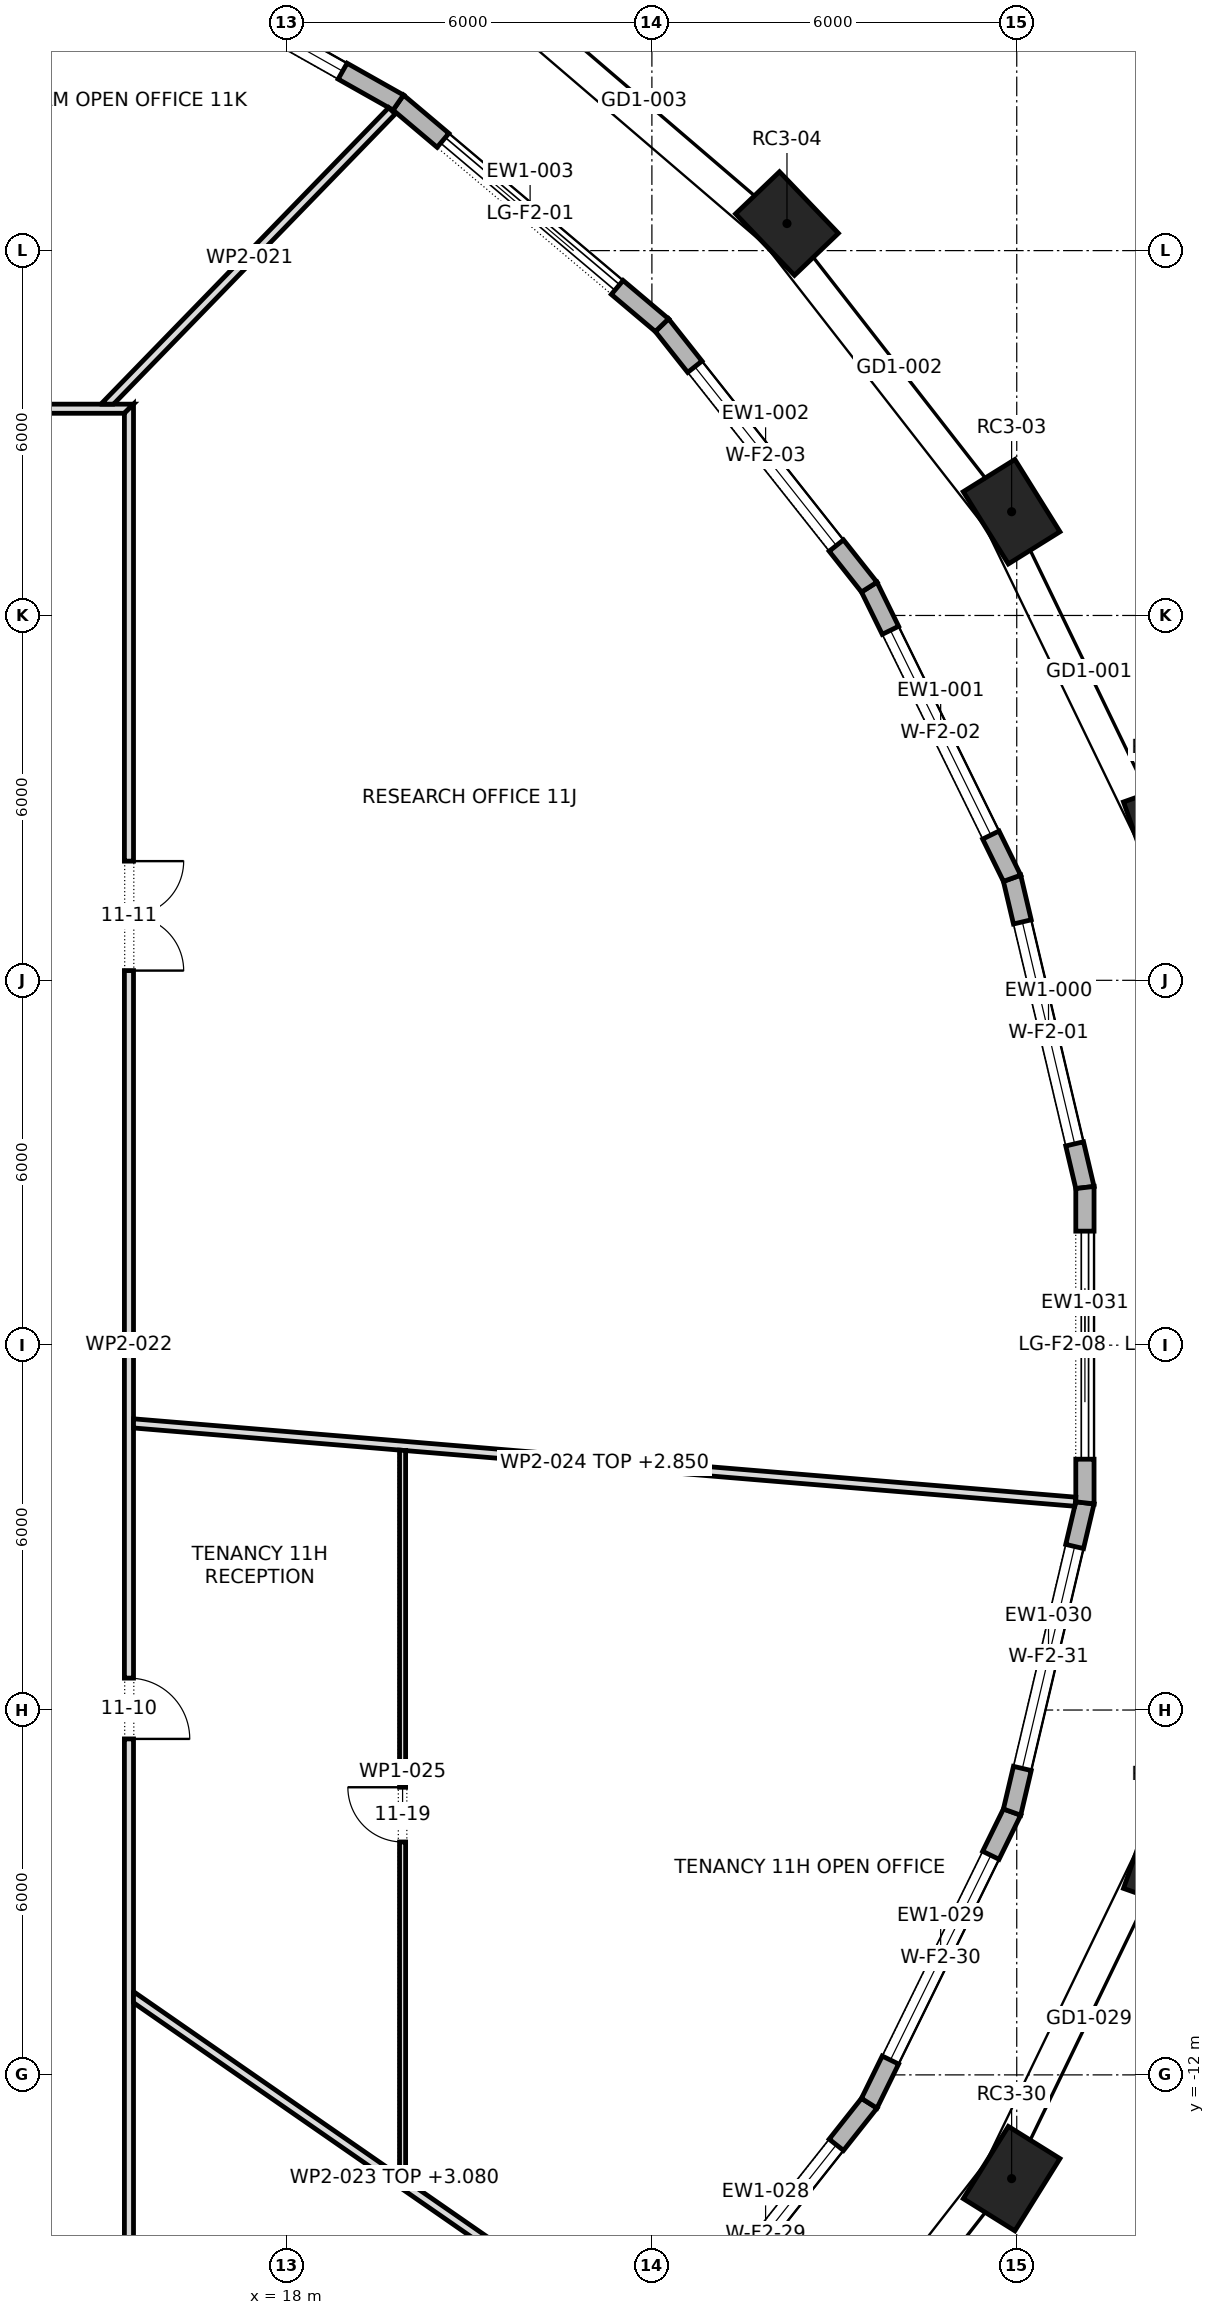
"""IFC4 building model, lengths in metres.
Left out: names, types, materials, properties, quantities, classifications, styles, units other than length and angle.
Written with IfcOpenShell. Run it as: python <this file> out.ifc"""

import sys

from ifc_helpers import new_model, si_unit, direction, frame, frame_2d, origin, origin_2d, place, context, subcontext, project, spatial, polyline, rectangle, outline, extrude, element, fill, save


model = new_model("IFC4")
c1 = context("Model", 3, precision=1e-05, world=origin(), true_north=direction((0.0, 1.0)))
c2 = subcontext(c1, "Body", "Model", "MODEL_VIEW")
j1 = project(units=[si_unit("LENGTHUNIT", "METRE"), si_unit("PLANEANGLEUNIT", "RADIAN")], contexts=[c1])
p1 = place(None, origin())
s1 = spatial("IfcSite", under=j1, at=p1, CompositionType="ELEMENT")
p2 = place(p1, origin())
s2 = spatial("IfcBuilding", under=s1, at=p2, CompositionType="ELEMENT")
p3 = place(p2, frame((0.0, 0.0, 163.3)))
s3 = spatial("IfcBuildingStorey", under=s2, at=p3, CompositionType="ELEMENT", Elevation=163.3)
for number, where, z_axis, x_axis in (
    (1, (32.46, 8.44, 0.0), (0.0, 0.0, 1.0), (-0.334, 0.943, 0.0)),
    (2, (29.916, 13.706, 0.0), (0.0, 0.0, 1.0), (-0.529, 0.849, 0.0)),
    (3, (26.221, 18.445, 0.0), (0.0, 0.0, 1.0), (-0.692, 0.722, 0.0)),
    (4, (29.916, -13.706, 0.0), (0.0, 0.0, 1.0), (0.529, 0.849, 0.0)),
    (5, (32.46, -8.44, 0.0), (0.0, 0.0, 1.0), (0.334, 0.943, 0.0)),
):
    element("IfcColumn", number, at=place(p3, frame(where, z_axis=z_axis, x_axis=x_axis)), inside=s3, PredefinedType="COLUMN", context=c2, shape_type="SweptSolid", body=[
        extrude(rectangle(XDim=1.4, YDim=1.0, at=origin_2d()), origin(), (0.0, 0.0, 1.0), 4.2),
    ])
p4 = place(p3, frame((31.121, 2.593, 0.0), z_axis=(0.0, 0.0, 1.0), x_axis=(-0.229297175564, 0.973356463624, 0.0)))
e6 = element("IfcWall", 6, at=p4, inside=s3, PredefinedType="STANDARD", context=c2, shape_type="SweptSolid", body=[
    extrude(outline(polyline([(-0.017, -0.15), (5.241, -0.15), (5.208, 0.15), (0.017, 0.15), (-0.017, -0.15)])), origin(), (0.0, 0.0, 1.0), 3.85),
])
p5 = place(p4, frame((0.737, 0.0, 0.6)))
e7 = element("IfcOpeningElement", 7, at=p5, cuts=e6, PredefinedType="OPENING", context=c2, shape_type="SweptSolid", body=[
    extrude(rectangle(XDim=3.75, YDim=2.85, at=frame_2d((1.875, 1.425))), frame((0.0, 0.162, 0.0), z_axis=(0.0, -1.0, 0.0), x_axis=(1.0, 0.0, 0.0)), (0.0, 0.0, 1.0), 0.324),
])
p6 = place(p3, frame((29.923, 7.678, 0.0), z_axis=(0.0, 0.0, 1.0), x_axis=(-0.440444485575, 0.897779847806, 0.0)))
e8 = element("IfcWall", 8, at=p6, inside=s3, PredefinedType="STANDARD", context=c2, shape_type="SweptSolid", body=[
    extrude(outline(polyline([(-0.017, -0.15), (5.35, -0.15), (5.317, 0.15), (0.017, 0.15), (-0.017, -0.15)])), origin(), (0.0, 0.0, 1.0), 3.85),
])
p7 = place(p6, frame((0.792, 0.0, 0.6)))
e9 = element("IfcOpeningElement", 9, at=p7, cuts=e8, PredefinedType="OPENING", context=c2, shape_type="SweptSolid", body=[
    extrude(rectangle(XDim=3.75, YDim=2.85, at=frame_2d((1.875, 1.425))), frame((0.0, 0.162, 0.0), z_axis=(0.0, -1.0, 0.0), x_axis=(1.0, 0.0, 0.0)), (0.0, 0.0, 1.0), 0.324),
])
p8 = place(p3, frame((27.574, 12.467, 0.0), z_axis=(0.0, 0.0, 1.0), x_axis=(-0.620577705153, 0.784144955902, 0.0)))
e10 = element("IfcWall", 10, at=p8, inside=s3, PredefinedType="STANDARD", context=c2, shape_type="SweptSolid", body=[
    extrude(outline(polyline([(-0.016, -0.15), (5.508, -0.15), (5.478, 0.15), (0.016, 0.15), (-0.016, -0.15)])), origin(), (0.0, 0.0, 1.0), 3.85),
])
p9 = place(p8, frame((0.871, 0.0, 0.6)))
e11 = element("IfcOpeningElement", 11, at=p9, cuts=e10, PredefinedType="OPENING", context=c2, shape_type="SweptSolid", body=[
    extrude(rectangle(XDim=3.75, YDim=2.85, at=frame_2d((1.875, 1.425))), frame((0.0, 0.162, 0.0), z_axis=(0.0, -1.0, 0.0), x_axis=(1.0, 0.0, 0.0)), (0.0, 0.0, 1.0), 0.324),
])
p10 = place(p3, frame((24.165, 16.774, 0.0), z_axis=(0.0, 0.0, 1.0), x_axis=(-0.764076096085, 0.645126126732, 0.0)))
e12 = element("IfcWall", 12, at=p10, inside=s3, PredefinedType="STANDARD", context=c2, shape_type="SweptSolid", body=[
    extrude(outline(polyline([(-0.015, -0.15), (5.689, -0.15), (5.661, 0.15), (0.015, 0.15), (-0.015, -0.15)])), origin(), (0.0, 0.0, 1.0), 3.85),
])
p11 = place(p10, frame((0.962, 0.0, 0.0)))
e13 = element("IfcOpeningElement", 13, at=p11, cuts=e12, PredefinedType="OPENING", context=c2, shape_type="SweptSolid", body=[
    extrude(rectangle(XDim=3.75, YDim=3.45, at=frame_2d((1.875, 1.725))), frame((0.0, 0.162, 0.0), z_axis=(0.0, -1.0, 0.0), x_axis=(1.0, 0.0, 0.0)), (0.0, 0.0, 1.0), 0.324),
])
p12 = place(p3, frame((19.829, 20.435, 0.0), z_axis=(0.0, 0.0, 1.0), x_axis=(-0.870982130072, 0.491314694565, 0.0)))
e14 = element("IfcWall", 14, at=p12, inside=s3, PredefinedType="STANDARD", context=c2, shape_type="SweptSolid", body=[
    extrude(outline(polyline([(-0.014, -0.15), (5.865, -0.15), (5.838, 0.15), (0.014, 0.15), (-0.014, -0.15)])), origin(), (0.0, 0.0, 1.0), 3.85),
])
p13 = place(p12, frame((1.051, 0.0, 0.6)))
e15 = element("IfcOpeningElement", 15, at=p13, cuts=e14, PredefinedType="OPENING", context=c2, shape_type="SweptSolid", body=[
    extrude(rectangle(XDim=3.75, YDim=2.85, at=frame_2d((1.875, 1.425))), frame((0.0, 0.162, 0.0), z_axis=(0.0, -1.0, 0.0), x_axis=(1.0, 0.0, 0.0)), (0.0, 0.0, 1.0), 0.324),
])
p14 = place(p3, frame((24.165, -16.774, 0.0), z_axis=(0.0, 0.0, 1.0), x_axis=(0.620577705153, 0.784144955902, 0.0)))
e16 = element("IfcWall", 16, at=p14, inside=s3, PredefinedType="STANDARD", context=c2, shape_type="SweptSolid", body=[
    extrude(outline(polyline([(-0.015, -0.15), (5.509, -0.15), (5.477, 0.15), (0.015, 0.15), (-0.015, -0.15)])), origin(), (0.0, 0.0, 1.0), 3.85),
])
p15 = place(p14, frame((0.871, 0.0, 0.6)))
e17 = element("IfcOpeningElement", 17, at=p15, cuts=e16, PredefinedType="OPENING", context=c2, shape_type="SweptSolid", body=[
    extrude(rectangle(XDim=3.75, YDim=2.85, at=frame_2d((1.875, 1.425))), frame((0.0, 0.162, 0.0), z_axis=(0.0, -1.0, 0.0), x_axis=(1.0, 0.0, 0.0)), (0.0, 0.0, 1.0), 0.324),
])
p16 = place(p3, frame((27.574, -12.467, 0.0), z_axis=(0.0, 0.0, 1.0), x_axis=(0.440444485575, 0.897779847806, 0.0)))
e18 = element("IfcWall", 18, at=p16, inside=s3, PredefinedType="STANDARD", context=c2, shape_type="SweptSolid", body=[
    extrude(outline(polyline([(-0.016, -0.15), (5.35, -0.15), (5.317, 0.15), (0.016, 0.15), (-0.016, -0.15)])), origin(), (0.0, 0.0, 1.0), 3.85),
])
p17 = place(p16, frame((0.792, 0.0, 0.6)))
e19 = element("IfcOpeningElement", 19, at=p17, cuts=e18, PredefinedType="OPENING", context=c2, shape_type="SweptSolid", body=[
    extrude(rectangle(XDim=3.75, YDim=2.85, at=frame_2d((1.875, 1.425))), frame((0.0, 0.162, 0.0), z_axis=(0.0, -1.0, 0.0), x_axis=(1.0, 0.0, 0.0)), (0.0, 0.0, 1.0), 0.324),
])
p18 = place(p3, frame((29.923, -7.678, 0.0), z_axis=(0.0, 0.0, 1.0), x_axis=(0.229297175564, 0.973356463624, 0.0)))
e20 = element("IfcWall", 20, at=p18, inside=s3, PredefinedType="STANDARD", context=c2, shape_type="SweptSolid", body=[
    extrude(outline(polyline([(-0.017, -0.15), (5.242, -0.15), (5.207, 0.15), (0.017, 0.15), (-0.017, -0.15)])), origin(), (0.0, 0.0, 1.0), 3.85),
])
p19 = place(p18, frame((0.737, 0.0, 0.6)))
e21 = element("IfcOpeningElement", 21, at=p19, cuts=e20, PredefinedType="OPENING", context=c2, shape_type="SweptSolid", body=[
    extrude(rectangle(XDim=3.75, YDim=2.85, at=frame_2d((1.875, 1.425))), frame((0.0, 0.162, 0.0), z_axis=(0.0, -1.0, 0.0), x_axis=(1.0, 0.0, 0.0)), (0.0, 0.0, 1.0), 0.324),
])
p20 = place(p3, frame((31.121, -2.593, 0.0), z_axis=(0.0, 0.0, 1.0), x_axis=(0.0, 1.0, 0.0)))
e22 = element("IfcWall", 22, at=p20, inside=s3, PredefinedType="STANDARD", context=c2, shape_type="SweptSolid", body=[
    extrude(outline(polyline([(-0.017, -0.15), (5.203, -0.15), (5.168, 0.15), (0.017, 0.15), (-0.017, -0.15)])), origin(), (0.0, 0.0, 1.0), 3.85),
])
p21 = place(p20, frame((0.718, 0.0, 0.0)))
e23 = element("IfcOpeningElement", 23, at=p21, cuts=e22, PredefinedType="OPENING", context=c2, shape_type="SweptSolid", body=[
    extrude(rectangle(XDim=3.75, YDim=3.45, at=frame_2d((1.875, 1.725))), frame((0.0, 0.162, 0.0), z_axis=(0.0, -1.0, 0.0), x_axis=(1.0, 0.0, 0.0)), (0.0, 0.0, 1.0), 0.324),
])
p22 = place(p3, frame((5.53, 15.4, 0.0), z_axis=(0.0, 0.0, 1.0), x_axis=(1.0, 0.0, 0.0)))
e24 = element("IfcWall", 24, at=p22, inside=s3, PredefinedType="PARTITIONING", context=c2, shape_type="SweptSolid", body=[
    extrude(outline(polyline([(0.0, -0.075), (1.959, -0.075), (3.918, -0.075), (5.877, -0.075), (7.836, -0.075), (9.795, -0.075), (9.945, 0.075), (7.956, 0.075), (5.967, 0.075), (3.978, 0.075), (1.989, 0.075), (0.0, 0.075), (0.0, -0.075)])), origin(), (0.0, 0.0, 1.0), 3.85),
])
p23 = place(p22, frame((4.22, 0.0, 0.0)))
e25 = element("IfcOpeningElement", 25, at=p23, cuts=e24, PredefinedType="OPENING", context=c2, shape_type="SweptSolid", body=[
    extrude(rectangle(XDim=1.0, YDim=2.1, at=frame_2d((0.5, 1.05))), frame((0.0, 0.087, 0.0), z_axis=(0.0, -1.0, 0.0), x_axis=(1.0, 0.0, 0.0)), (0.0, 0.0, 1.0), 0.174),
])
p24 = place(p3, frame((14.992, 15.423, 0.0), z_axis=(0.0, 0.0, 1.0), x_axis=(0.696574400919, 0.71748456707, 0.0)))
e26 = element("IfcWall", 26, at=p24, inside=s3, PredefinedType="PARTITIONING", context=c2, shape_type="SweptSolid", body=[
    extrude(outline(polyline([(0.0, 0.075), (0.0, 0.074), (0.145, -0.075), (1.808, -0.075), (3.47, -0.075), (5.133, -0.075), (6.795, -0.075), (6.795, 0.075), (5.096, 0.075), (3.397, 0.075), (1.699, 0.075), (0.0, 0.075)])), origin(), (0.0, 0.0, 1.0), 3.85),
])
p25 = place(p3, frame((15.4, -15.475, 0.0), z_axis=(0.0, 0.0, 1.0), x_axis=(0.0, 1.0, 0.0)))
e27 = element("IfcWall", 27, at=p25, inside=s3, PredefinedType="PARTITIONING", context=c2, shape_type="SweptSolid", body=[
    extrude(outline(polyline([(0.0, -0.075), (1.935, -0.075), (3.869, -0.075), (5.803, -0.075), (7.738, -0.075), (9.672, -0.075), (11.606, -0.075), (13.541, -0.075), (15.475, -0.075), (17.409, -0.075), (19.344, -0.075), (21.278, -0.075), (23.212, -0.075), (25.147, -0.075), (27.081, -0.075), (29.016, -0.075), (30.95, -0.075), (30.8, 0.075), (28.885, 0.075), (26.969, 0.075), (25.053, 0.075), (23.138, 0.075), (21.222, 0.075), (19.306, 0.075), (17.391, 0.075), (15.475, 0.075), (13.56, 0.075), (11.644, 0.075), (9.728, 0.075), (7.812, 0.075), (5.897, 0.075), (3.981, 0.075), (2.066, 0.075), (0.15, 0.075), (0.0, -0.075)])), origin(), (0.0, 0.0, 1.0), 3.85),
])
p26 = place(p25, frame((9.0, 0.0, 0.0)))
e28 = element("IfcOpeningElement", 28, at=p26, cuts=e27, PredefinedType="OPENING", context=c2, shape_type="SweptSolid", body=[
    extrude(rectangle(XDim=1.0, YDim=2.1, at=frame_2d((0.5, 1.05))), frame((0.0, 0.087, 0.0), z_axis=(0.0, -1.0, 0.0), x_axis=(1.0, 0.0, 0.0)), (0.0, 0.0, 1.0), 0.174),
])
p27 = place(p25, frame((21.635, 0.0, 0.0)))
e29 = element("IfcOpeningElement", 29, at=p27, cuts=e27, PredefinedType="OPENING", context=c2, shape_type="SweptSolid", body=[
    extrude(rectangle(XDim=1.8, YDim=2.1, at=frame_2d((0.9, 1.05))), frame((0.0, 0.087, 0.0), z_axis=(0.0, -1.0, 0.0), x_axis=(1.0, 0.0, 0.0)), (0.0, 0.0, 1.0), 0.174),
])
p28 = place(p3, frame((15.433, -10.692, 0.0), z_axis=(0.0, 0.0, 1.0), x_axis=(0.821818585553, -0.569749254006, 0.0)))
e30 = element("IfcWall", 30, at=p28, inside=s3, PredefinedType="PARTITIONING", context=c2, shape_type="SweptSolid", body=[
    extrude(outline(polyline([(0.104, -0.075), (1.832, -0.075), (3.56, -0.075), (5.288, -0.075), (7.016, -0.075), (8.744, -0.075), (10.472, -0.075), (10.493, 0.002), (10.497, 0.072), (10.497, 0.075), (8.773, 0.075), (7.049, 0.075), (5.325, 0.075), (5.324, 0.074), (5.323, 0.075), (3.549, 0.075), (1.774, 0.075), (0.0, 0.075), (0.0, 0.074), (0.104, -0.075)])), origin(), (0.0, 0.0, 1.0), 3.08),
])
p29 = place(p3, frame((15.469, -1.286, 0.0), z_axis=(0.0, 0.0, 1.0), x_axis=(0.996560145348, -0.082872653534, 0.0)))
e31 = element("IfcWall", 31, at=p29, inside=s3, PredefinedType="PARTITIONING", context=c2, shape_type="SweptSolid", body=[
    extrude(outline(polyline([(0.012, -0.075), (1.504, -0.075), (2.996, -0.075), (4.488, -0.075), (4.502, -0.074), (4.502, -0.075), (6.343, -0.075), (8.183, -0.075), (10.023, -0.075), (11.864, -0.075), (13.704, -0.075), (15.544, -0.075), (15.549, -0.045), (15.549, 0.075), (13.605, 0.075), (11.662, 0.075), (9.718, 0.075), (7.774, 0.075), (5.831, 0.075), (3.887, 0.075), (1.944, 0.075), (0.0, 0.075), (0.0, 0.07), (0.012, -0.075)])), origin(), (0.0, 0.0, 1.0), 2.85),
])
p30 = place(p3, frame((19.9, -1.726, 0.0), z_axis=(0.0, 0.0, 1.0), x_axis=(0.0, -1.0, 0.0)))
e32 = element("IfcWall", 32, at=p30, inside=s3, PredefinedType="PARTITIONING", context=c2, shape_type="SweptSolid", body=[
    extrude(outline(polyline([(0.0, -0.05), (1.99, -0.05), (3.979, -0.05), (5.969, -0.05), (7.959, -0.05), (9.948, -0.05), (11.938, -0.05), (12.007, 0.049), (12.007, 0.05), (10.007, 0.05), (8.007, 0.05), (6.007, 0.05), (4.008, 0.05), (2.008, 0.05), (0.008, 0.05), (0.0, -0.047), (0.0, -0.05)])), origin(), (0.0, 0.0, 1.0), 3.85),
])
p31 = place(p30, frame((5.544, 0.0, 0.0)))
e33 = element("IfcOpeningElement", 33, at=p31, cuts=e32, PredefinedType="OPENING", context=c2, shape_type="SweptSolid", body=[
    extrude(rectangle(XDim=0.9, YDim=2.1, at=frame_2d((0.45, 1.05))), frame((0.0, 0.062, 0.0), z_axis=(0.0, -1.0, 0.0), x_axis=(1.0, 0.0, 0.0)), (0.0, 0.0, 1.0), 0.124),
])
p32 = place(p5, origin())
e34 = element("IfcWindow", 34, at=p32, inside=s3, PartitioningType="TRIPLE_PANEL_VERTICAL", PredefinedType="WINDOW", context=c2, shape_type="SweptSolid", body=[
    extrude(rectangle(XDim=3.75, YDim=2.85, at=frame_2d((1.875, 1.425))), frame((0.0, 0.03, 0.0), z_axis=(0.0, -1.0, 0.0), x_axis=(1.0, 0.0, 0.0)), (0.0, 0.0, 1.0), 0.06),
])
fill(e7, e34)
p33 = place(p7, origin())
e35 = element("IfcWindow", 35, at=p33, inside=s3, PartitioningType="TRIPLE_PANEL_VERTICAL", PredefinedType="WINDOW", context=c2, shape_type="SweptSolid", body=[
    extrude(rectangle(XDim=3.75, YDim=2.85, at=frame_2d((1.875, 1.425))), frame((0.0, 0.03, 0.0), z_axis=(0.0, -1.0, 0.0), x_axis=(1.0, 0.0, 0.0)), (0.0, 0.0, 1.0), 0.06),
])
fill(e9, e35)
p34 = place(p9, origin())
e36 = element("IfcWindow", 36, at=p34, inside=s3, PartitioningType="TRIPLE_PANEL_VERTICAL", PredefinedType="WINDOW", context=c2, shape_type="SweptSolid", body=[
    extrude(rectangle(XDim=3.75, YDim=2.85, at=frame_2d((1.875, 1.425))), frame((0.0, 0.03, 0.0), z_axis=(0.0, -1.0, 0.0), x_axis=(1.0, 0.0, 0.0)), (0.0, 0.0, 1.0), 0.06),
])
fill(e11, e36)
p35 = place(p11, origin())
e37 = element("IfcDoor", 37, at=p35, inside=s3, OperationType="DOUBLE_DOOR_SLIDING", PredefinedType="DOOR", context=c2, shape_type="SweptSolid", body=[
    extrude(rectangle(XDim=3.75, YDim=3.45, at=frame_2d((1.875, 1.725))), frame((0.0, 0.025, 0.0), z_axis=(0.0, -1.0, 0.0), x_axis=(1.0, 0.0, 0.0)), (0.0, 0.0, 1.0), 0.05),
])
fill(e13, e37)
p36 = place(p13, origin())
e38 = element("IfcWindow", 38, at=p36, inside=s3, PartitioningType="TRIPLE_PANEL_VERTICAL", PredefinedType="WINDOW", context=c2, shape_type="SweptSolid", body=[
    extrude(rectangle(XDim=3.75, YDim=2.85, at=frame_2d((1.875, 1.425))), frame((0.0, 0.03, 0.0), z_axis=(0.0, -1.0, 0.0), x_axis=(1.0, 0.0, 0.0)), (0.0, 0.0, 1.0), 0.06),
])
fill(e15, e38)
p37 = place(p15, origin())
e39 = element("IfcWindow", 39, at=p37, inside=s3, PartitioningType="TRIPLE_PANEL_VERTICAL", PredefinedType="WINDOW", context=c2, shape_type="SweptSolid", body=[
    extrude(rectangle(XDim=3.75, YDim=2.85, at=frame_2d((1.875, 1.425))), frame((0.0, 0.03, 0.0), z_axis=(0.0, -1.0, 0.0), x_axis=(1.0, 0.0, 0.0)), (0.0, 0.0, 1.0), 0.06),
])
fill(e17, e39)
p38 = place(p17, origin())
e40 = element("IfcWindow", 40, at=p38, inside=s3, PartitioningType="TRIPLE_PANEL_VERTICAL", PredefinedType="WINDOW", context=c2, shape_type="SweptSolid", body=[
    extrude(rectangle(XDim=3.75, YDim=2.85, at=frame_2d((1.875, 1.425))), frame((0.0, 0.03, 0.0), z_axis=(0.0, -1.0, 0.0), x_axis=(1.0, 0.0, 0.0)), (0.0, 0.0, 1.0), 0.06),
])
fill(e19, e40)
p39 = place(p19, origin())
e41 = element("IfcWindow", 41, at=p39, inside=s3, PartitioningType="TRIPLE_PANEL_VERTICAL", PredefinedType="WINDOW", context=c2, shape_type="SweptSolid", body=[
    extrude(rectangle(XDim=3.75, YDim=2.85, at=frame_2d((1.875, 1.425))), frame((0.0, 0.03, 0.0), z_axis=(0.0, -1.0, 0.0), x_axis=(1.0, 0.0, 0.0)), (0.0, 0.0, 1.0), 0.06),
])
fill(e21, e41)
p40 = place(p21, origin())
e42 = element("IfcDoor", 42, at=p40, inside=s3, OperationType="DOUBLE_DOOR_SLIDING", PredefinedType="DOOR", context=c2, shape_type="SweptSolid", body=[
    extrude(rectangle(XDim=3.75, YDim=3.45, at=frame_2d((1.875, 1.725))), frame((0.0, 0.025, 0.0), z_axis=(0.0, -1.0, 0.0), x_axis=(1.0, 0.0, 0.0)), (0.0, 0.0, 1.0), 0.05),
])
fill(e23, e42)
p41 = place(p26, frame((1.0, 0.0, 0.0), z_axis=(0.0, 0.0, 1.0), x_axis=(-1.0, 0.0, 0.0)))
e43 = element("IfcDoor", 43, at=p41, inside=s3, OperationType="SINGLE_SWING_LEFT", PredefinedType="DOOR", context=c2, shape_type="SweptSolid", body=[
    extrude(rectangle(XDim=1.0, YDim=2.1, at=frame_2d((0.5, 1.05))), frame((0.0, 0.025, 0.0), z_axis=(0.0, -1.0, 0.0), x_axis=(1.0, 0.0, 0.0)), (0.0, 0.0, 1.0), 0.05),
])
fill(e28, e43)
p42 = place(p27, frame((1.8, 0.0, 0.0), z_axis=(0.0, 0.0, 1.0), x_axis=(-1.0, 0.0, 0.0)))
e44 = element("IfcDoor", 44, at=p42, inside=s3, OperationType="DOUBLE_DOOR_SINGLE_SWING", PredefinedType="DOOR", context=c2, shape_type="SweptSolid", body=[
    extrude(rectangle(XDim=1.8, YDim=2.1, at=frame_2d((0.9, 1.05))), frame((0.0, 0.025, 0.0), z_axis=(0.0, -1.0, 0.0), x_axis=(1.0, 0.0, 0.0)), (0.0, 0.0, 1.0), 0.05),
])
fill(e29, e44)
p43 = place(p31, frame((0.9, 0.0, 0.0), z_axis=(0.0, 0.0, 1.0), x_axis=(-1.0, 0.0, 0.0)))
e45 = element("IfcDoor", 45, at=p43, inside=s3, OperationType="SINGLE_SWING_LEFT", PredefinedType="DOOR", context=c2, shape_type="SweptSolid", body=[
    extrude(rectangle(XDim=0.9, YDim=2.1, at=frame_2d((0.45, 1.05))), frame((0.0, 0.025, 0.0), z_axis=(0.0, -1.0, 0.0), x_axis=(1.0, 0.0, 0.0)), (0.0, 0.0, 1.0), 0.05),
])
fill(e33, e45)
save(model, sys.argv[1])
